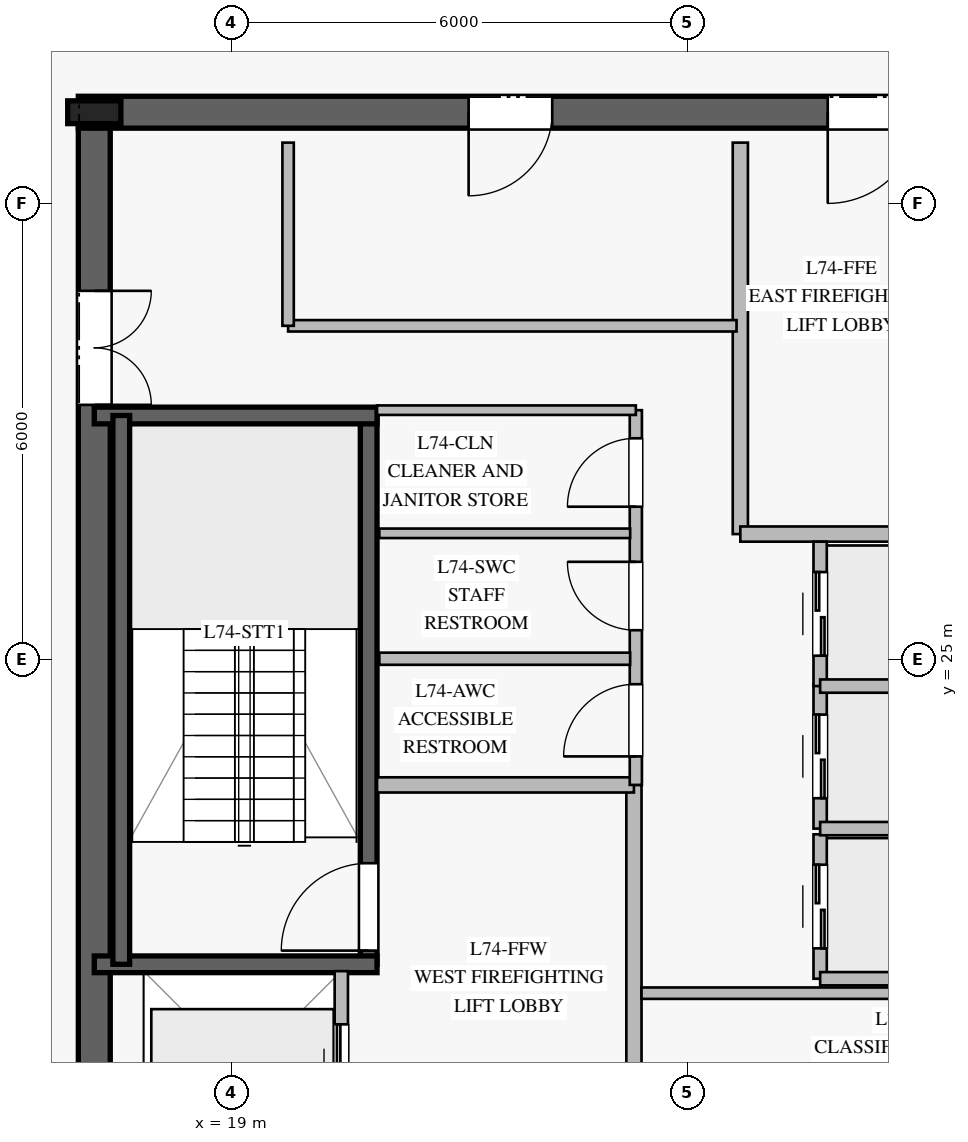
"""IFC4 building model, lengths in metres.
Left out: names, types, materials, properties, quantities, classifications, styles, units other than length and angle.
Written with IfcOpenShell. Run it as: python <this file> out.ifc"""

import sys

from ifc_helpers import new_model, si_unit, direction, frame, frame_2d, origin, origin_2d, place, context, subcontext, project, spatial, rectangle, i_section, extrude, element, fill, save


model = new_model("IFC4")
c1 = context("Model", 3, precision=1e-05, world=origin(), true_north=direction((0.0, 1.0)))
c2 = subcontext(c1, "Body", "Model", "MODEL_VIEW")
j1 = project(units=[si_unit("LENGTHUNIT", "METRE"), si_unit("PLANEANGLEUNIT", "RADIAN")], contexts=[c1])
p1 = place(None, origin())
s1 = spatial("IfcSite", under=j1, at=p1, CompositionType="ELEMENT")
p2 = place(p1, origin())
s2 = spatial("IfcBuilding", under=s1, at=p2, CompositionType="ELEMENT")
p3 = place(p2, frame((0.0, 0.0, 306.2)))
s3 = spatial("IfcBuildingStorey", under=s2, at=p3, CompositionType="ELEMENT", Elevation=306.2)
p4 = place(p3, frame((33.01, 32.2, 0.0), z_axis=(0.0, 0.0, 1.0), x_axis=(-1.0, 0.0, 0.0)))
e1 = element("IfcWall", 1, at=p4, inside=s3, PredefinedType="SHEAR", context=c2, shape_type="SweptSolid", body=[
    extrude(rectangle(XDim=16.02, YDim=0.42, at=frame_2d((8.01, 0.0))), origin(), (0.0, 0.0, 1.0), 3.78),
])
p5 = place(p4, frame((4.96, 0.0, 0.0)))
e2 = element("IfcOpeningElement", 2, at=p5, cuts=e1, PredefinedType="OPENING", context=c2, shape_type="SweptSolid", body=[
    extrude(rectangle(XDim=1.2, YDim=2.25, at=frame_2d((0.6, 1.125))), frame((0.0, 0.22, 0.0), z_axis=(0.0, -1.0, 0.0), x_axis=(1.0, 0.0, 0.0)), (0.0, 0.0, 1.0), 0.44),
])
p6 = place(p4, frame((9.785, 0.0, 0.0)))
e3 = element("IfcOpeningElement", 3, at=p6, cuts=e1, PredefinedType="OPENING", context=c2, shape_type="SweptSolid", body=[
    extrude(rectangle(XDim=1.1, YDim=2.2, at=frame_2d((0.55, 1.1))), frame((0.0, 0.22, 0.0), z_axis=(0.0, -1.0, 0.0), x_axis=(1.0, 0.0, 0.0)), (0.0, 0.0, 1.0), 0.44),
])
p7 = place(p3, frame((17.2, 31.99, 0.0), z_axis=(0.0, 0.0, 1.0), x_axis=(0.0, -1.0, 0.0)))
e4 = element("IfcWall", 4, at=p7, inside=s3, PredefinedType="SHEAR", context=c2, shape_type="SweptSolid", body=[
    extrude(rectangle(XDim=13.98, YDim=0.42, at=frame_2d((6.99, 0.0))), origin(), (0.0, 0.0, 1.0), 3.78),
])
p8 = place(p7, frame((2.14, 0.0, 0.0)))
e5 = element("IfcOpeningElement", 5, at=p8, cuts=e4, PredefinedType="OPENING", context=c2, shape_type="SweptSolid", body=[
    extrude(rectangle(XDim=1.5, YDim=2.2, at=frame_2d((0.75, 1.1))), frame((0.0, 0.22, 0.0), z_axis=(0.0, -1.0, 0.0), x_axis=(1.0, 0.0, 0.0)), (0.0, 0.0, 1.0), 0.44),
])
p9 = place(p3, frame((17.2, 32.2, 0.0), z_axis=(0.0, 0.0, 1.0), x_axis=(1.0, 0.0, 0.0)))
e6 = element("IfcColumn", 6, at=p9, inside=s3, PredefinedType="COLUMN", context=c2, shape_type="SweptSolid", body=[
    extrude(i_section(OverallWidth=0.3, OverallDepth=0.7, WebThickness=0.017, FlangeThickness=0.032, at=origin_2d()), origin(), (0.0, 0.0, 1.0), 4.0),
])
p10 = place(p3, frame((20.81, 20.99, 0.0), z_axis=(0.0, 0.0, 1.0), x_axis=(0.0, 1.0, 0.0)))
e7 = element("IfcWall", 7, at=p10, inside=s3, PredefinedType="SOLIDWALL", context=c2, shape_type="SweptSolid", body=[
    extrude(rectangle(XDim=7.22, YDim=0.22, at=frame_2d((3.61, 0.0))), origin(), (0.0, 0.0, 1.0), 3.78),
])
p11 = place(p10, frame((0.18, 0.0, 0.0)))
e8 = element("IfcOpeningElement", 8, at=p11, cuts=e7, PredefinedType="OPENING", context=c2, shape_type="SweptSolid", body=[
    extrude(rectangle(XDim=1.15, YDim=2.2, at=frame_2d((0.575, 1.1))), frame((0.0, 0.12, 0.0), z_axis=(0.0, -1.0, 0.0), x_axis=(1.0, 0.0, 0.0)), (0.0, 0.0, 1.0), 0.24),
])
for number, where, z_axis, x_axis in (
    (9, (17.2, 20.99, 0.0), (0.0, 0.0, 1.0), (1.0, 0.0, 0.0)),
    (10, (17.2, 28.21, 0.0), (0.0, 0.0, 1.0), (1.0, 0.0, 0.0)),
):
    element("IfcWall", number, at=place(p3, frame(where, z_axis=z_axis, x_axis=x_axis)), inside=s3, PredefinedType="SOLIDWALL", context=c2, shape_type="SweptSolid", body=[
        extrude(rectangle(XDim=3.72, YDim=0.22, at=frame_2d((1.86, 0.0))), origin(), (0.0, 0.0, 1.0), 3.78),
    ])
p12 = place(p3, frame((17.555, 28.21, 0.0), z_axis=(0.0, 0.0, 1.0), x_axis=(0.0, -1.0, 0.0)))
e11 = element("IfcWall", 11, at=p12, inside=s3, PredefinedType="SOLIDWALL", context=c2, shape_type="SweptSolid", body=[
    extrude(rectangle(XDim=7.22, YDim=0.22, at=frame_2d((3.61, 0.0))), origin(), (0.0, 0.0, 1.0), 3.78),
])
p13 = place(p3, frame((24.3, 18.2, 0.0), z_axis=(0.0, 0.0, 1.0), x_axis=(0.0, 1.0, 0.0)))
e12 = element("IfcWall", 12, at=p13, inside=s3, PredefinedType="PARTITIONING", context=c2, shape_type="SweptSolid", body=[
    extrude(rectangle(XDim=5.15, YDim=0.2, at=frame_2d((2.575, 0.0))), origin(), (0.0, 0.0, 1.0), 3.78),
])
p14 = place(p3, frame((20.92, 23.35, 0.0), z_axis=(0.0, 0.0, 1.0), x_axis=(1.0, 0.0, 0.0)))
e13 = element("IfcWall", 13, at=p14, inside=s3, PredefinedType="PARTITIONING", context=c2, shape_type="SweptSolid", body=[
    extrude(rectangle(XDim=3.38, YDim=0.2, at=frame_2d((1.69, 0.0))), origin(), (0.0, 0.0, 1.0), 3.78),
])
p15 = place(p3, frame((25.7, 26.65, 0.0), z_axis=(0.0, 0.0, 1.0), x_axis=(0.0, 1.0, 0.0)))
e14 = element("IfcWall", 14, at=p15, inside=s3, PredefinedType="PARTITIONING", context=c2, shape_type="SweptSolid", body=[
    extrude(rectangle(XDim=5.15, YDim=0.2, at=frame_2d((2.575, 0.0))), origin(), (0.0, 0.0, 1.0), 3.78),
])
p16 = place(p3, frame((25.7, 26.65, 0.0), z_axis=(0.0, 0.0, 1.0), x_axis=(1.0, 0.0, 0.0)))
e15 = element("IfcWall", 15, at=p16, inside=s3, PredefinedType="PARTITIONING", context=c2, shape_type="SweptSolid", body=[
    extrude(rectangle(XDim=3.38, YDim=0.2, at=frame_2d((1.69, 0.0))), origin(), (0.0, 0.0, 1.0), 3.78),
])
p17 = place(p3, frame((24.325, 23.35, 0.0), z_axis=(0.0, 0.0, 1.0), x_axis=(0.0, 1.0, 0.0)))
e16 = element("IfcWall", 16, at=p17, inside=s3, PredefinedType="PLUMBINGWALL", context=c2, shape_type="SweptSolid", body=[
    extrude(rectangle(XDim=4.93, YDim=0.16, at=frame_2d((2.465, 0.0))), origin(), (0.0, 0.0, 1.0), 3.78),
])
p18 = place(p17, frame((0.375, 0.0, 0.0)))
e17 = element("IfcOpeningElement", 17, at=p18, cuts=e16, PredefinedType="OPENING", context=c2, shape_type="SweptSolid", body=[
    extrude(rectangle(XDim=0.95, YDim=2.1, at=frame_2d((0.475, 1.05))), frame((0.0, 0.09, 0.0), z_axis=(0.0, -1.0, 0.0), x_axis=(1.0, 0.0, 0.0)), (0.0, 0.0, 1.0), 0.18),
])
p19 = place(p17, frame((2.035, 0.0, 0.0)))
e18 = element("IfcOpeningElement", 18, at=p19, cuts=e16, PredefinedType="OPENING", context=c2, shape_type="SweptSolid", body=[
    extrude(rectangle(XDim=0.9, YDim=2.1, at=frame_2d((0.45, 1.05))), frame((0.0, 0.09, 0.0), z_axis=(0.0, -1.0, 0.0), x_axis=(1.0, 0.0, 0.0)), (0.0, 0.0, 1.0), 0.18),
])
p20 = place(p17, frame((3.66, 0.0, 0.0)))
e19 = element("IfcOpeningElement", 19, at=p20, cuts=e16, PredefinedType="OPENING", context=c2, shape_type="SweptSolid", body=[
    extrude(rectangle(XDim=0.9, YDim=2.1, at=frame_2d((0.45, 1.05))), frame((0.0, 0.09, 0.0), z_axis=(0.0, -1.0, 0.0), x_axis=(1.0, 0.0, 0.0)), (0.0, 0.0, 1.0), 0.18),
])
p21 = place(p3, frame((20.92, 28.28, 0.0), z_axis=(0.0, 0.0, 1.0), x_axis=(1.0, 0.0, 0.0)))
e20 = element("IfcWall", 20, at=p21, inside=s3, PredefinedType="PARTITIONING", context=c2, shape_type="SweptSolid", body=[
    extrude(rectangle(XDim=3.405, YDim=0.125, at=frame_2d((1.703, 0.0))), origin(), (0.0, 0.0, 1.0), 3.78),
])
p22 = place(p3, frame((20.95, 25.01, 0.0), z_axis=(0.0, 0.0, 1.0), x_axis=(1.0, 0.0, 0.0)))
e21 = element("IfcWall", 21, at=p22, inside=s3, PredefinedType="PLUMBINGWALL", context=c2, shape_type="SweptSolid", body=[
    extrude(rectangle(XDim=3.3, YDim=0.16, at=frame_2d((1.65, 0.0))), origin(), (0.0, 0.0, 1.0), 3.78),
])
p23 = place(p3, frame((20.95, 26.66, 0.0), z_axis=(0.0, 0.0, 1.0), x_axis=(1.0, 0.0, 0.0)))
e22 = element("IfcWall", 22, at=p23, inside=s3, PredefinedType="PARTITIONING", context=c2, shape_type="SweptSolid", body=[
    extrude(rectangle(XDim=3.3, YDim=0.125, at=frame_2d((1.65, 0.0))), origin(), (0.0, 0.0, 1.0), 3.78),
])
p24 = place(p3, frame((24.4, 20.61, 0.0), z_axis=(0.0, 0.0, 1.0), x_axis=(1.0, 0.0, 0.0)))
e23 = element("IfcWall", 23, at=p24, inside=s3, PredefinedType="PARTITIONING", context=c2, shape_type="SweptSolid", body=[
    extrude(rectangle(XDim=5.9, YDim=0.15, at=frame_2d((2.95, 0.0))), origin(), (0.0, 0.0, 1.0), 3.78),
])
p25 = place(p3, frame((19.75, 29.39, 0.0), z_axis=(0.0, 0.0, 1.0), x_axis=(1.0, 0.0, 0.0)))
e24 = element("IfcWall", 24, at=p25, inside=s3, PredefinedType="PARTITIONING", context=c2, shape_type="SweptSolid", body=[
    extrude(rectangle(XDim=5.9, YDim=0.15, at=frame_2d((2.95, 0.0))), origin(), (0.0, 0.0, 1.0), 3.78),
])
p26 = place(p3, frame((19.75, 29.39, 0.0), z_axis=(0.0, 0.0, 1.0), x_axis=(0.0, 1.0, 0.0)))
e25 = element("IfcWall", 25, at=p26, inside=s3, PredefinedType="PARTITIONING", context=c2, shape_type="SweptSolid", body=[
    extrude(rectangle(XDim=2.41, YDim=0.15, at=frame_2d((1.205, 0.0))), origin(), (0.0, 0.0, 1.0), 3.78),
])
p27 = place(p3, frame((26.75, 20.8, 0.0), z_axis=(0.0, 0.0, 1.0), x_axis=(0.0, 1.0, 0.0)))
e26 = element("IfcWall", 26, at=p27, inside=s3, PredefinedType="PARTITIONING", context=c2, shape_type="SweptSolid", body=[
    extrude(rectangle(XDim=1.9, YDim=0.175, at=frame_2d((0.95, 0.0))), origin(), (0.0, 0.0, 1.0), 3.78),
])
p28 = place(p27, frame((0.4, 0.0, 0.0)))
e27 = element("IfcOpeningElement", 27, at=p28, cuts=e26, PredefinedType="OPENING", context=c2, shape_type="SweptSolid", body=[
    extrude(rectangle(XDim=1.1, YDim=2.2, at=frame_2d((0.55, 1.1))), frame((0.0, 0.098, 0.0), z_axis=(0.0, -1.0, 0.0), x_axis=(1.0, 0.0, 0.0)), (0.0, 0.0, 1.0), 0.195),
])
p29 = place(p3, frame((26.75, 20.8, 0.0), z_axis=(0.0, 0.0, 1.0), x_axis=(1.0, 0.0, 0.0)))
e28 = element("IfcWall", 28, at=p29, inside=s3, PredefinedType="PARTITIONING", context=c2, shape_type="SweptSolid", body=[
    extrude(rectangle(XDim=2.35, YDim=0.175, at=frame_2d((1.175, 0.0))), origin(), (0.0, 0.0, 1.0), 3.78),
])
p30 = place(p3, frame((26.75, 22.775, 0.0), z_axis=(0.0, 0.0, 1.0), x_axis=(0.0, 1.0, 0.0)))
e29 = element("IfcWall", 29, at=p30, inside=s3, PredefinedType="PARTITIONING", context=c2, shape_type="SweptSolid", body=[
    extrude(rectangle(XDim=1.9, YDim=0.175, at=frame_2d((0.95, 0.0))), origin(), (0.0, 0.0, 1.0), 3.78),
])
p31 = place(p30, frame((0.4, 0.0, 0.0)))
e30 = element("IfcOpeningElement", 30, at=p31, cuts=e29, PredefinedType="OPENING", context=c2, shape_type="SweptSolid", body=[
    extrude(rectangle(XDim=1.1, YDim=2.2, at=frame_2d((0.55, 1.1))), frame((0.0, 0.098, 0.0), z_axis=(0.0, -1.0, 0.0), x_axis=(1.0, 0.0, 0.0)), (0.0, 0.0, 1.0), 0.195),
])
p32 = place(p3, frame((26.75, 22.775, 0.0), z_axis=(0.0, 0.0, 1.0), x_axis=(1.0, 0.0, 0.0)))
e31 = element("IfcWall", 31, at=p32, inside=s3, PredefinedType="PARTITIONING", context=c2, shape_type="SweptSolid", body=[
    extrude(rectangle(XDim=2.35, YDim=0.175, at=frame_2d((1.175, 0.0))), origin(), (0.0, 0.0, 1.0), 3.78),
])
p33 = place(p3, frame((26.75, 24.65, 0.0), z_axis=(0.0, 0.0, 1.0), x_axis=(0.0, 1.0, 0.0)))
e32 = element("IfcWall", 32, at=p33, inside=s3, PredefinedType="PARTITIONING", context=c2, shape_type="SweptSolid", body=[
    extrude(rectangle(XDim=1.9, YDim=0.175, at=frame_2d((0.95, 0.0))), origin(), (0.0, 0.0, 1.0), 3.78),
])
p34 = place(p33, frame((0.4, 0.0, 0.0)))
e33 = element("IfcOpeningElement", 33, at=p34, cuts=e32, PredefinedType="OPENING", context=c2, shape_type="SweptSolid", body=[
    extrude(rectangle(XDim=1.1, YDim=2.2, at=frame_2d((0.55, 1.1))), frame((0.0, 0.098, 0.0), z_axis=(0.0, -1.0, 0.0), x_axis=(1.0, 0.0, 0.0)), (0.0, 0.0, 1.0), 0.195),
])
p35 = place(p3, frame((26.75, 24.65, 0.0), z_axis=(0.0, 0.0, 1.0), x_axis=(1.0, 0.0, 0.0)))
e34 = element("IfcWall", 34, at=p35, inside=s3, PredefinedType="PARTITIONING", context=c2, shape_type="SweptSolid", body=[
    extrude(rectangle(XDim=2.35, YDim=0.175, at=frame_2d((1.175, 0.0))), origin(), (0.0, 0.0, 1.0), 3.78),
])
p36 = place(p3, frame((20.45, 18.3, 0.0), z_axis=(0.0, 0.0, 1.0), x_axis=(0.0, 1.0, 0.0)))
e35 = element("IfcWall", 35, at=p36, inside=s3, PredefinedType="PARTITIONING", context=c2, shape_type="SweptSolid", body=[
    extrude(rectangle(XDim=2.6, YDim=0.175, at=frame_2d((1.3, 0.0))), origin(), (0.0, 0.0, 1.0), 3.78),
])
p37 = place(p36, frame((0.7, 0.0, 0.0)))
e36 = element("IfcOpeningElement", 36, at=p37, cuts=e35, PredefinedType="OPENING", context=c2, shape_type="SweptSolid", body=[
    extrude(rectangle(XDim=1.2, YDim=2.2, at=frame_2d((0.6, 1.1))), frame((0.0, 0.098, 0.0), z_axis=(0.0, -1.0, 0.0), x_axis=(1.0, 0.0, 0.0)), (0.0, 0.0, 1.0), 0.195),
])
p38 = place(p11, origin())
e37 = element("IfcDoor", 37, at=p38, inside=s3, OperationType="SINGLE_SWING_LEFT", PredefinedType="DOOR", context=c2, shape_type="SweptSolid", body=[
    extrude(rectangle(XDim=1.15, YDim=2.2, at=frame_2d((0.575, 1.1))), frame((0.0, 0.025, 0.0), z_axis=(0.0, -1.0, 0.0), x_axis=(1.0, 0.0, 0.0)), (0.0, 0.0, 1.0), 0.05),
])
fill(e8, e37)
p39 = place(p5, origin())
e38 = element("IfcDoor", 38, at=p39, inside=s3, OperationType="SINGLE_SWING_RIGHT", PredefinedType="DOOR", context=c2, shape_type="SweptSolid", body=[
    extrude(rectangle(XDim=1.2, YDim=2.25, at=frame_2d((0.6, 1.125))), frame((0.0, 0.025, 0.0), z_axis=(0.0, -1.0, 0.0), x_axis=(1.0, 0.0, 0.0)), (0.0, 0.0, 1.0), 0.05),
])
fill(e2, e38)
p40 = place(p8, origin())
e39 = element("IfcDoor", 39, at=p40, inside=s3, OperationType="DOUBLE_DOOR_SINGLE_SWING", PredefinedType="DOOR", context=c2, shape_type="SweptSolid", body=[
    extrude(rectangle(XDim=1.5, YDim=2.2, at=frame_2d((0.75, 1.1))), frame((0.0, 0.025, 0.0), z_axis=(0.0, -1.0, 0.0), x_axis=(1.0, 0.0, 0.0)), (0.0, 0.0, 1.0), 0.05),
])
fill(e5, e39)
p41 = place(p18, origin())
e40 = element("IfcDoor", 40, at=p41, inside=s3, OperationType="SINGLE_SWING_LEFT", PredefinedType="DOOR", context=c2, shape_type="SweptSolid", body=[
    extrude(rectangle(XDim=0.95, YDim=2.1, at=frame_2d((0.475, 1.05))), frame((0.0, 0.025, 0.0), z_axis=(0.0, -1.0, 0.0), x_axis=(1.0, 0.0, 0.0)), (0.0, 0.0, 1.0), 0.05),
])
fill(e17, e40)
p42 = place(p19, origin())
e41 = element("IfcDoor", 41, at=p42, inside=s3, OperationType="SINGLE_SWING_RIGHT", PredefinedType="DOOR", context=c2, shape_type="SweptSolid", body=[
    extrude(rectangle(XDim=0.9, YDim=2.1, at=frame_2d((0.45, 1.05))), frame((0.0, 0.025, 0.0), z_axis=(0.0, -1.0, 0.0), x_axis=(1.0, 0.0, 0.0)), (0.0, 0.0, 1.0), 0.05),
])
fill(e18, e41)
p43 = place(p20, origin())
e42 = element("IfcDoor", 42, at=p43, inside=s3, OperationType="SINGLE_SWING_LEFT", PredefinedType="DOOR", context=c2, shape_type="SweptSolid", body=[
    extrude(rectangle(XDim=0.9, YDim=2.1, at=frame_2d((0.45, 1.05))), frame((0.0, 0.025, 0.0), z_axis=(0.0, -1.0, 0.0), x_axis=(1.0, 0.0, 0.0)), (0.0, 0.0, 1.0), 0.05),
])
fill(e19, e42)
p44 = place(p6, origin())
e43 = element("IfcDoor", 43, at=p44, inside=s3, OperationType="SINGLE_SWING_RIGHT", PredefinedType="DOOR", context=c2, shape_type="SweptSolid", body=[
    extrude(rectangle(XDim=1.1, YDim=2.2, at=frame_2d((0.55, 1.1))), frame((0.0, 0.025, 0.0), z_axis=(0.0, -1.0, 0.0), x_axis=(1.0, 0.0, 0.0)), (0.0, 0.0, 1.0), 0.05),
])
fill(e3, e43)
p45 = place(p28, origin())
e44 = element("IfcDoor", 44, at=p45, inside=s3, OperationType="DOUBLE_DOOR_SLIDING", PredefinedType="DOOR", context=c2, shape_type="SweptSolid", body=[
    extrude(rectangle(XDim=1.1, YDim=2.2, at=frame_2d((0.55, 1.1))), frame((0.0, 0.025, 0.0), z_axis=(0.0, -1.0, 0.0), x_axis=(1.0, 0.0, 0.0)), (0.0, 0.0, 1.0), 0.05),
])
fill(e27, e44)
p46 = place(p31, origin())
e45 = element("IfcDoor", 45, at=p46, inside=s3, OperationType="DOUBLE_DOOR_SLIDING", PredefinedType="DOOR", context=c2, shape_type="SweptSolid", body=[
    extrude(rectangle(XDim=1.1, YDim=2.2, at=frame_2d((0.55, 1.1))), frame((0.0, 0.025, 0.0), z_axis=(0.0, -1.0, 0.0), x_axis=(1.0, 0.0, 0.0)), (0.0, 0.0, 1.0), 0.05),
])
fill(e30, e45)
p47 = place(p34, origin())
e46 = element("IfcDoor", 46, at=p47, inside=s3, OperationType="DOUBLE_DOOR_SLIDING", PredefinedType="DOOR", context=c2, shape_type="SweptSolid", body=[
    extrude(rectangle(XDim=1.1, YDim=2.2, at=frame_2d((0.55, 1.1))), frame((0.0, 0.025, 0.0), z_axis=(0.0, -1.0, 0.0), x_axis=(1.0, 0.0, 0.0)), (0.0, 0.0, 1.0), 0.05),
])
fill(e33, e46)
p48 = place(p37, origin())
e47 = element("IfcDoor", 47, at=p48, inside=s3, OperationType="DOUBLE_DOOR_SLIDING", PredefinedType="DOOR", context=c2, shape_type="SweptSolid", body=[
    extrude(rectangle(XDim=1.2, YDim=2.2, at=frame_2d((0.6, 1.1))), frame((0.0, 0.025, 0.0), z_axis=(0.0, -1.0, 0.0), x_axis=(1.0, 0.0, 0.0)), (0.0, 0.0, 1.0), 0.05),
])
fill(e36, e47)
save(model, sys.argv[1])
